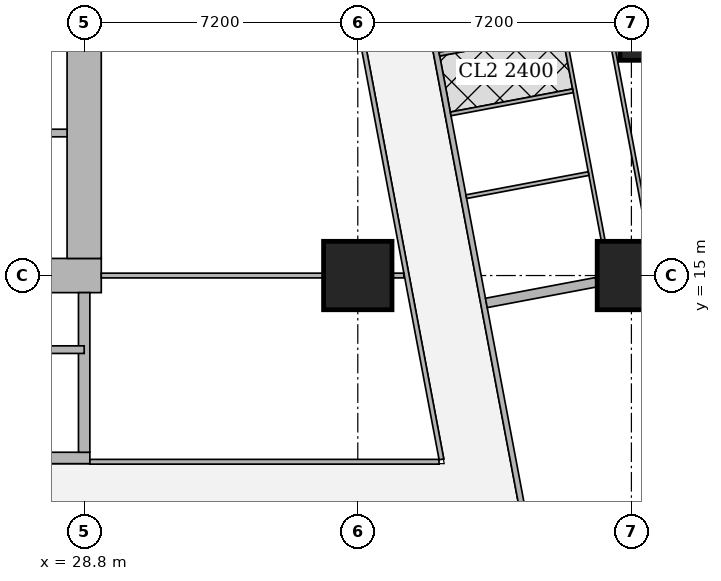
"""IFC4 building model, lengths in metres.
Left out: names, types, materials, properties, quantities, classifications, styles, units other than length and angle.
Written with IfcOpenShell. Run it as: python <this file> out.ifc"""

import sys

from ifc_helpers import new_model, si_unit, direction, frame, frame_2d, origin, origin_2d, place, context, subcontext, project, spatial, rectangle, extrude, element, fill, save


model = new_model("IFC4")
c1 = context("Model", 3, precision=1e-05, world=origin(), true_north=direction((0.0, 1.0)))
c2 = subcontext(c1, "Body", "Model", "MODEL_VIEW")
j1 = project(units=[si_unit("LENGTHUNIT", "METRE"), si_unit("PLANEANGLEUNIT", "RADIAN")], contexts=[c1])
p1 = place(None, origin())
s1 = spatial("IfcSite", under=j1, at=p1, CompositionType="ELEMENT")
p2 = place(p1, origin())
s2 = spatial("IfcBuilding", under=s1, at=p2, CompositionType="ELEMENT")
p3 = place(p2, frame((0.0, 0.0, 31.25)))
s3 = spatial("IfcBuildingStorey", under=s2, at=p3, CompositionType="ELEMENT", Elevation=31.25)
for number, where, z_axis, x_axis in (
    (1, (36.0, 15.0, 0.0), (0.0, 0.0, 1.0), (1.0, 0.0, 0.0)),
    (2, (43.2, 15.0, 0.0), (0.0, 0.0, 1.0), (1.0, 0.0, 0.0)),
):
    element("IfcColumn", number, at=place(p3, frame(where, z_axis=z_axis, x_axis=x_axis)), inside=s3, PredefinedType="COLUMN", context=c2, shape_type="SweptSolid", body=[
        extrude(rectangle(XDim=1.8, YDim=1.8, at=origin_2d()), origin(), (0.0, 0.0, 1.0), 3.75),
    ])
p4 = place(p3, frame((44.697, 22.263, 0.0), z_axis=(0.0, 0.0, 1.0), x_axis=(1.0, 0.0, 0.0)))
e3 = element("IfcColumn", 3, at=p4, inside=s3, PredefinedType="COLUMN", context=c2, shape_type="SweptSolid", body=[
    extrude(rectangle(XDim=3.6, YDim=3.2, at=origin_2d()), origin(), (0.0, 0.0, 1.0), 3.75),
])
p5 = place(p3, frame((13.95, 15.0, 0.0), z_axis=(0.0, 0.0, 1.0), x_axis=(1.0, 0.0, 0.0)))
e4 = element("IfcWall", 4, at=p5, inside=s3, PredefinedType="SHEAR", context=c2, shape_type="SweptSolid", body=[
    extrude(rectangle(XDim=15.3, YDim=0.9, at=frame_2d((7.65, 0.0))), origin(), (0.0, 0.0, 1.0), 3.75),
])
p6 = place(p5, frame((4.45, 0.0, 0.0)))
e5 = element("IfcOpeningElement", 5, at=p6, cuts=e4, PredefinedType="OPENING", context=c2, shape_type="SweptSolid", body=[
    extrude(rectangle(XDim=1.8, YDim=2.1, at=frame_2d((0.9, 1.05))), frame((0.0, 0.46, 0.0), z_axis=(0.0, -1.0, 0.0), x_axis=(1.0, 0.0, 0.0)), (0.0, 0.0, 1.0), 0.92),
])
p7 = place(p5, frame((10.7, 0.0, 0.0)))
e6 = element("IfcOpeningElement", 6, at=p7, cuts=e4, PredefinedType="OPENING", context=c2, shape_type="SweptSolid", body=[
    extrude(rectangle(XDim=1.1, YDim=2.1, at=frame_2d((0.55, 1.05))), frame((0.0, 0.46, 0.0), z_axis=(0.0, -1.0, 0.0), x_axis=(1.0, 0.0, 0.0)), (0.0, 0.0, 1.0), 0.92),
])
p8 = place(p3, frame((28.8, 15.45, 0.0), z_axis=(0.0, 0.0, 1.0), x_axis=(0.0, 1.0, 0.0)))
e7 = element("IfcWall", 7, at=p8, inside=s3, PredefinedType="SHEAR", context=c2, shape_type="SweptSolid", body=[
    extrude(rectangle(XDim=14.1, YDim=0.9, at=frame_2d((7.05, 0.0))), origin(), (0.0, 0.0, 1.0), 3.75),
])
p9 = place(p3, frame((21.45, 10.2, 0.0), z_axis=(0.0, 0.0, 1.0), x_axis=(1.0, 0.0, 0.0)))
e8 = element("IfcWall", 8, at=p9, inside=s3, PredefinedType="SHEAR", context=c2, shape_type="SweptSolid", body=[
    extrude(rectangle(XDim=7.5, YDim=0.3, at=frame_2d((3.75, 0.0))), origin(), (0.0, 0.0, 1.0), 3.75),
])
p10 = place(p9, frame((0.5, 0.0, 0.0)))
e9 = element("IfcOpeningElement", 9, at=p10, cuts=e8, PredefinedType="OPENING", context=c2, shape_type="SweptSolid", body=[
    extrude(rectangle(XDim=1.1, YDim=2.1, at=frame_2d((0.55, 1.05))), frame((0.0, 0.16, 0.0), z_axis=(0.0, -1.0, 0.0), x_axis=(1.0, 0.0, 0.0)), (0.0, 0.0, 1.0), 0.32),
])
p11 = place(p3, frame((28.8, 10.35, 0.0), z_axis=(0.0, 0.0, 1.0), x_axis=(0.0, 1.0, 0.0)))
e10 = element("IfcWall", 10, at=p11, inside=s3, PredefinedType="SHEAR", context=c2, shape_type="SweptSolid", body=[
    extrude(rectangle(XDim=4.2, YDim=0.3, at=frame_2d((2.1, 0.0))), origin(), (0.0, 0.0, 1.0), 3.75),
])
p12 = place(p3, frame((50.653, 2.703, 0.0), z_axis=(0.0, 0.0, 1.0), x_axis=(-0.185612026696, 0.982623109613, 0.0)))
e11 = element("IfcWall", 11, at=p12, inside=s3, PredefinedType="SOLIDWALL", context=c2, shape_type="SweptSolid", body=[
    extrude(rectangle(XDim=41.393, YDim=0.2, at=frame_2d((20.697, 0.0))), origin(), (0.0, 0.0, 1.0), 3.5),
])
p13 = place(p12, frame((1.633, 0.0, 0.9)))
e12 = element("IfcOpeningElement", 12, at=p13, cuts=e11, PredefinedType="OPENING", context=c2, shape_type="SweptSolid", body=[
    extrude(rectangle(XDim=1.8, YDim=1.5, at=frame_2d((0.9, 0.75))), frame((0.0, 0.11, 0.0), z_axis=(0.0, -1.0, 0.0), x_axis=(1.0, 0.0, 0.0)), (0.0, 0.0, 1.0), 0.22),
])
p14 = place(p12, frame((6.032, 0.0, 0.9)))
e13 = element("IfcOpeningElement", 13, at=p14, cuts=e11, PredefinedType="OPENING", context=c2, shape_type="SweptSolid", body=[
    extrude(rectangle(XDim=1.8, YDim=1.5, at=frame_2d((0.9, 0.75))), frame((0.0, 0.11, 0.0), z_axis=(0.0, -1.0, 0.0), x_axis=(1.0, 0.0, 0.0)), (0.0, 0.0, 1.0), 0.22),
])
p15 = place(p12, frame((9.848, 0.0, 0.9)))
e14 = element("IfcOpeningElement", 14, at=p15, cuts=e11, PredefinedType="OPENING", context=c2, shape_type="SweptSolid", body=[
    extrude(rectangle(XDim=1.8, YDim=1.5, at=frame_2d((0.9, 0.75))), frame((0.0, 0.11, 0.0), z_axis=(0.0, -1.0, 0.0), x_axis=(1.0, 0.0, 0.0)), (0.0, 0.0, 1.0), 0.22),
])
p16 = place(p12, frame((17.481, 0.0, 0.9)))
e15 = element("IfcOpeningElement", 15, at=p16, cuts=e11, PredefinedType="OPENING", context=c2, shape_type="SweptSolid", body=[
    extrude(rectangle(XDim=1.8, YDim=1.5, at=frame_2d((0.9, 0.75))), frame((0.0, 0.11, 0.0), z_axis=(0.0, -1.0, 0.0), x_axis=(1.0, 0.0, 0.0)), (0.0, 0.0, 1.0), 0.22),
])
p17 = place(p12, frame((21.297, 0.0, 0.9)))
e16 = element("IfcOpeningElement", 16, at=p17, cuts=e11, PredefinedType="OPENING", context=c2, shape_type="SweptSolid", body=[
    extrude(rectangle(XDim=1.8, YDim=1.5, at=frame_2d((0.9, 0.75))), frame((0.0, 0.11, 0.0), z_axis=(0.0, -1.0, 0.0), x_axis=(1.0, 0.0, 0.0)), (0.0, 0.0, 1.0), 0.22),
])
p18 = place(p12, frame((25.113, 0.0, 0.9)))
e17 = element("IfcOpeningElement", 17, at=p18, cuts=e11, PredefinedType="OPENING", context=c2, shape_type="SweptSolid", body=[
    extrude(rectangle(XDim=1.8, YDim=1.5, at=frame_2d((0.9, 0.75))), frame((0.0, 0.11, 0.0), z_axis=(0.0, -1.0, 0.0), x_axis=(1.0, 0.0, 0.0)), (0.0, 0.0, 1.0), 0.22),
])
p19 = place(p12, frame((28.93, 0.0, 0.9)))
e18 = element("IfcOpeningElement", 18, at=p19, cuts=e11, PredefinedType="OPENING", context=c2, shape_type="SweptSolid", body=[
    extrude(rectangle(XDim=1.8, YDim=1.5, at=frame_2d((0.9, 0.75))), frame((0.0, 0.11, 0.0), z_axis=(0.0, -1.0, 0.0), x_axis=(1.0, 0.0, 0.0)), (0.0, 0.0, 1.0), 0.22),
])
p20 = place(p12, frame((32.746, 0.0, 0.9)))
e19 = element("IfcOpeningElement", 19, at=p20, cuts=e11, PredefinedType="OPENING", context=c2, shape_type="SweptSolid", body=[
    extrude(rectangle(XDim=1.8, YDim=1.5, at=frame_2d((0.9, 0.75))), frame((0.0, 0.11, 0.0), z_axis=(0.0, -1.0, 0.0), x_axis=(1.0, 0.0, 0.0)), (0.0, 0.0, 1.0), 0.22),
])
p21 = place(p12, frame((36.481, 0.0, 0.9)))
e20 = element("IfcOpeningElement", 20, at=p21, cuts=e11, PredefinedType="OPENING", context=c2, shape_type="SweptSolid", body=[
    extrude(rectangle(XDim=1.8, YDim=1.5, at=frame_2d((0.9, 0.75))), frame((0.0, 0.11, 0.0), z_axis=(0.0, -1.0, 0.0), x_axis=(1.0, 0.0, 0.0)), (0.0, 0.0, 1.0), 0.22),
])
p22 = place(p3, frame((35.094, 36.585, 0.0), z_axis=(0.0, 0.0, 1.0), x_axis=(0.185588860311, -0.982627485331, 0.0)))
e21 = element("IfcWall", 21, at=p22, inside=s3, PredefinedType="SOLIDWALL", context=c2, shape_type="SweptSolid", body=[
    extrude(rectangle(XDim=34.797, YDim=0.15, at=frame_2d((17.399, 0.0))), origin(), (0.0, 0.0, 1.0), 2.5),
])
p23 = place(p22, frame((6.012, 0.0, 0.0)))
e22 = element("IfcOpeningElement", 22, at=p23, cuts=e21, PredefinedType="OPENING", context=c2, shape_type="SweptSolid", body=[
    extrude(rectangle(XDim=1.0, YDim=2.1, at=frame_2d((0.5, 1.05))), frame((0.0, 0.085, 0.0), z_axis=(0.0, -1.0, 0.0), x_axis=(1.0, 0.0, 0.0)), (0.0, 0.0, 1.0), 0.17),
])
p24 = place(p22, frame((9.828, 0.0, 0.0)))
e23 = element("IfcOpeningElement", 23, at=p24, cuts=e21, PredefinedType="OPENING", context=c2, shape_type="SweptSolid", body=[
    extrude(rectangle(XDim=1.0, YDim=2.1, at=frame_2d((0.5, 1.05))), frame((0.0, 0.085, 0.0), z_axis=(0.0, -1.0, 0.0), x_axis=(1.0, 0.0, 0.0)), (0.0, 0.0, 1.0), 0.17),
])
p25 = place(p22, frame((25.9, 0.0, 0.0)))
e24 = element("IfcOpeningElement", 24, at=p25, cuts=e21, PredefinedType="OPENING", context=c2, shape_type="SweptSolid", body=[
    extrude(rectangle(XDim=1.0, YDim=2.1, at=frame_2d((0.5, 1.05))), frame((0.0, 0.085, 0.0), z_axis=(0.0, -1.0, 0.0), x_axis=(1.0, 0.0, 0.0)), (0.0, 0.0, 1.0), 0.17),
])
p26 = place(p3, frame((41.894, 25.366, 0.0), z_axis=(0.0, 0.0, 1.0), x_axis=(0.185581190027, -0.982628933987, 0.0)))
e25 = element("IfcWall", 25, at=p26, inside=s3, PredefinedType="PARTITIONING", context=c2, shape_type="SweptSolid", body=[
    extrude(rectangle(XDim=9.623, YDim=0.1, at=frame_2d((4.812, 0.0))), origin(), (0.0, 0.0, 1.0), 2.5),
])
p27 = place(p26, frame((0.151, 0.0, 0.0)))
e26 = element("IfcOpeningElement", 26, at=p27, cuts=e25, PredefinedType="OPENING", context=c2, shape_type="SweptSolid", body=[
    extrude(rectangle(XDim=0.9, YDim=2.1, at=frame_2d((0.45, 1.05))), frame((0.0, 0.06, 0.0), z_axis=(0.0, -1.0, 0.0), x_axis=(1.0, 0.0, 0.0)), (0.0, 0.0, 1.0), 0.12),
])
p28 = place(p26, frame((5.05, 0.0, 0.0)))
e27 = element("IfcOpeningElement", 27, at=p28, cuts=e25, PredefinedType="OPENING", context=c2, shape_type="SweptSolid", body=[
    extrude(rectangle(XDim=0.9, YDim=2.1, at=frame_2d((0.45, 1.05))), frame((0.0, 0.06, 0.0), z_axis=(0.0, -1.0, 0.0), x_axis=(1.0, 0.0, 0.0)), (0.0, 0.0, 1.0), 0.12),
])
p29 = place(p3, frame((40.706, 25.192, 0.0), z_axis=(0.0, 0.0, 1.0), x_axis=(0.185572668944, -0.982630543257, 0.0)))
e28 = element("IfcWall", 28, at=p29, inside=s3, PredefinedType="PARTITIONING", context=c2, shape_type="SweptSolid", body=[
    extrude(rectangle(XDim=9.446, YDim=0.1, at=frame_2d((4.723, 0.0))), origin(), (0.0, 0.0, 1.0), 2.5),
])
p30 = place(p29, frame((0.655, 0.0, 0.0)))
e29 = element("IfcOpeningElement", 29, at=p30, cuts=e28, PredefinedType="OPENING", context=c2, shape_type="SweptSolid", body=[
    extrude(rectangle(XDim=0.9, YDim=2.1, at=frame_2d((0.45, 1.05))), frame((0.0, 0.06, 0.0), z_axis=(0.0, -1.0, 0.0), x_axis=(1.0, 0.0, 0.0)), (0.0, 0.0, 1.0), 0.12),
])
p31 = place(p29, frame((4.166, 0.0, 0.0)))
e30 = element("IfcOpeningElement", 30, at=p31, cuts=e28, PredefinedType="OPENING", context=c2, shape_type="SweptSolid", body=[
    extrude(rectangle(XDim=0.9, YDim=2.1, at=frame_2d((0.45, 1.05))), frame((0.0, 0.06, 0.0), z_axis=(0.0, -1.0, 0.0), x_axis=(1.0, 0.0, 0.0)), (0.0, 0.0, 1.0), 0.12),
])
p32 = place(p29, frame((8.396, 0.0, 0.0)))
e31 = element("IfcOpeningElement", 31, at=p32, cuts=e28, PredefinedType="OPENING", context=c2, shape_type="SweptSolid", body=[
    extrude(rectangle(XDim=0.9, YDim=2.1, at=frame_2d((0.45, 1.05))), frame((0.0, 0.06, 0.0), z_axis=(0.0, -1.0, 0.0), x_axis=(1.0, 0.0, 0.0)), (0.0, 0.0, 1.0), 0.12),
])
p33 = place(p29, frame((2.563, 0.0, 0.0)))
e32 = element("IfcOpeningElement", 32, at=p33, cuts=e28, PredefinedType="OPENING", context=c2, shape_type="SweptSolid", body=[
    extrude(rectangle(XDim=0.9, YDim=2.1, at=frame_2d((0.45, 1.05))), frame((0.0, 0.06, 0.0), z_axis=(0.0, -1.0, 0.0), x_axis=(1.0, 0.0, 0.0)), (0.0, 0.0, 1.0), 0.12),
])
p34 = place(p29, frame((6.074, 0.0, 0.0)))
e33 = element("IfcOpeningElement", 33, at=p34, cuts=e28, PredefinedType="OPENING", context=c2, shape_type="SweptSolid", body=[
    extrude(rectangle(XDim=0.9, YDim=2.1, at=frame_2d((0.45, 1.05))), frame((0.0, 0.06, 0.0), z_axis=(0.0, -1.0, 0.0), x_axis=(1.0, 0.0, 0.0)), (0.0, 0.0, 1.0), 0.12),
])
for number, where, z_axis, x_axis in (
    (34, (41.365, 21.433, 0.0), (0.0, 0.0, 1.0), (-0.983, -0.186, 0.0)),
    (35, (42.073, 17.683, 0.0), (0.0, 0.0, 1.0), (-0.983, -0.186, 0.0)),
    (36, (41.662, 19.861, 0.0), (0.0, 0.0, 1.0), (-0.983, -0.186, 0.0)),
):
    element("IfcWall", number, at=place(p3, frame(where, z_axis=z_axis, x_axis=x_axis)), inside=s3, PredefinedType="PARTITIONING", context=c2, shape_type="SweptSolid", body=[
        extrude(rectangle(XDim=3.275, YDim=0.1, at=frame_2d((1.637, 0.0))), origin(), (0.0, 0.0, 1.0), 3.5),
    ])
p35 = place(p3, frame((42.276, 14.825, 0.0), z_axis=(0.0, 0.0, 1.0), x_axis=(-0.982656521819, -0.185435056358, 0.0)))
e37 = element("IfcWall", 37, at=p35, inside=s3, PredefinedType="SOLIDWALL", context=c2, shape_type="SweptSolid", body=[
    extrude(rectangle(XDim=2.944, YDim=0.25, at=frame_2d((1.472, 0.0))), origin(), (0.0, 0.0, 1.0), 3.5),
])
p36 = place(p3, frame((28.95, 10.1, 0.0), z_axis=(0.0, 0.0, 1.0), x_axis=(1.0, 0.0, 0.0)))
e38 = element("IfcWall", 38, at=p36, inside=s3, PredefinedType="PARTITIONING", context=c2, shape_type="SweptSolid", body=[
    extrude(rectangle(XDim=9.188, YDim=0.125, at=frame_2d((4.594, 0.0))), origin(), (0.0, 0.0, 1.0), 3.5),
])
p37 = place(p3, frame((38.202, 10.163, 0.0), z_axis=(0.0, 0.0, 1.0), x_axis=(-0.185610321132, 0.982623431783, 0.0)))
e39 = element("IfcWall", 39, at=p37, inside=s3, PredefinedType="PARTITIONING", context=c2, shape_type="SweptSolid", body=[
    extrude(rectangle(XDim=25.111, YDim=0.125, at=frame_2d((12.556, 0.0))), origin(), (0.0, 0.0, 1.0), 2.5),
])
p38 = place(p37, frame((0.708, 0.0, 0.0)))
e40 = element("IfcOpeningElement", 40, at=p38, cuts=e39, PredefinedType="OPENING", context=c2, shape_type="SweptSolid", body=[
    extrude(rectangle(XDim=1.0, YDim=2.1, at=frame_2d((0.5, 1.05))), frame((0.0, 0.073, 0.0), z_axis=(0.0, -1.0, 0.0), x_axis=(1.0, 0.0, 0.0)), (0.0, 0.0, 1.0), 0.145),
])
p39 = place(p37, frame((6.1, 0.0, 0.0)))
e41 = element("IfcOpeningElement", 41, at=p39, cuts=e39, PredefinedType="OPENING", context=c2, shape_type="SweptSolid", body=[
    extrude(rectangle(XDim=1.0, YDim=2.1, at=frame_2d((0.5, 1.05))), frame((0.0, 0.073, 0.0), z_axis=(0.0, -1.0, 0.0), x_axis=(1.0, 0.0, 0.0)), (0.0, 0.0, 1.0), 0.145),
])
p40 = place(p37, frame((13.378, 0.0, 0.0)))
e42 = element("IfcOpeningElement", 42, at=p40, cuts=e39, PredefinedType="OPENING", context=c2, shape_type="SweptSolid", body=[
    extrude(rectangle(XDim=1.0, YDim=2.1, at=frame_2d((0.5, 1.05))), frame((0.0, 0.073, 0.0), z_axis=(0.0, -1.0, 0.0), x_axis=(1.0, 0.0, 0.0)), (0.0, 0.0, 1.0), 0.145),
])
p41 = place(p37, frame((17.194, 0.0, 0.0)))
e43 = element("IfcOpeningElement", 43, at=p41, cuts=e39, PredefinedType="OPENING", context=c2, shape_type="SweptSolid", body=[
    extrude(rectangle(XDim=1.0, YDim=2.1, at=frame_2d((0.5, 1.05))), frame((0.0, 0.073, 0.0), z_axis=(0.0, -1.0, 0.0), x_axis=(1.0, 0.0, 0.0)), (0.0, 0.0, 1.0), 0.145),
])
p42 = place(p37, frame((21.35, 0.0, 0.0)))
e44 = element("IfcOpeningElement", 44, at=p42, cuts=e39, PredefinedType="OPENING", context=c2, shape_type="SweptSolid", body=[
    extrude(rectangle(XDim=1.0, YDim=2.1, at=frame_2d((0.5, 1.05))), frame((0.0, 0.073, 0.0), z_axis=(0.0, -1.0, 0.0), x_axis=(1.0, 0.0, 0.0)), (0.0, 0.0, 1.0), 0.145),
])
p43 = place(p3, frame((29.25, 15.0, 0.0), z_axis=(0.0, 0.0, 1.0), x_axis=(1.0, 0.0, 0.0)))
e45 = element("IfcWall", 45, at=p43, inside=s3, PredefinedType="PARTITIONING", context=c2, shape_type="SweptSolid", body=[
    extrude(rectangle(XDim=5.849, YDim=0.125, at=frame_2d((2.925, 0.0))), origin(), (0.0, 0.0, 1.0), 3.5),
])
p44 = place(p3, frame((36.901, 15.0, 0.0), z_axis=(0.0, 0.0, 1.0), x_axis=(1.0, 0.0, 0.0)))
e46 = element("IfcWall", 46, at=p44, inside=s3, PredefinedType="PARTITIONING", context=c2, shape_type="SweptSolid", body=[
    extrude(rectangle(XDim=0.312, YDim=0.125, at=frame_2d((0.156, 0.0))), origin(), (0.0, 0.0, 1.0), 3.5),
])
p45 = place(p3, frame((23.0, 13.05, 0.0), z_axis=(0.0, 0.0, 1.0), x_axis=(1.0, 0.0, 0.0)))
e47 = element("IfcWall", 47, at=p45, inside=s3, PredefinedType="SHEAR", context=c2, shape_type="SweptSolid", body=[
    extrude(rectangle(XDim=5.8, YDim=0.2, at=frame_2d((2.9, 0.0))), origin(), (0.0, 0.0, 1.0), 3.75),
])
p46 = place(p3, frame((27.4, 18.75, 0.0), z_axis=(0.0, 0.0, 1.0), x_axis=(1.0, 0.0, 0.0)))
e48 = element("IfcWall", 48, at=p46, inside=s3, PredefinedType="SOLIDWALL", context=c2, shape_type="SweptSolid", body=[
    extrude(rectangle(XDim=0.95, YDim=0.2, at=frame_2d((0.475, 0.0))), origin(), (0.0, 0.0, 1.0), 3.5),
])
p47 = place(p28, origin())
e49 = element("IfcDoor", 49, at=p47, inside=s3, OperationType="SINGLE_SWING_LEFT", PredefinedType="DOOR", context=c2, shape_type="SweptSolid", body=[
    extrude(rectangle(XDim=0.9, YDim=2.1, at=frame_2d((0.45, 1.05))), frame((0.0, 0.025, 0.0), z_axis=(0.0, -1.0, 0.0), x_axis=(1.0, 0.0, 0.0)), (0.0, 0.0, 1.0), 0.05),
])
fill(e27, e49)
p48 = place(p31, origin())
e50 = element("IfcDoor", 50, at=p48, inside=s3, OperationType="SINGLE_SWING_RIGHT", PredefinedType="DOOR", context=c2, shape_type="SweptSolid", body=[
    extrude(rectangle(XDim=0.9, YDim=2.1, at=frame_2d((0.45, 1.05))), frame((0.0, 0.025, 0.0), z_axis=(0.0, -1.0, 0.0), x_axis=(1.0, 0.0, 0.0)), (0.0, 0.0, 1.0), 0.05),
])
fill(e30, e50)
p49 = place(p32, origin())
e51 = element("IfcDoor", 51, at=p49, inside=s3, OperationType="SINGLE_SWING_LEFT", PredefinedType="DOOR", context=c2, shape_type="SweptSolid", body=[
    extrude(rectangle(XDim=0.9, YDim=2.1, at=frame_2d((0.45, 1.05))), frame((0.0, 0.025, 0.0), z_axis=(0.0, -1.0, 0.0), x_axis=(1.0, 0.0, 0.0)), (0.0, 0.0, 1.0), 0.05),
])
fill(e31, e51)
p50 = place(p34, origin())
e52 = element("IfcDoor", 52, at=p50, inside=s3, OperationType="SINGLE_SWING_LEFT", PredefinedType="DOOR", context=c2, shape_type="SweptSolid", body=[
    extrude(rectangle(XDim=0.9, YDim=2.1, at=frame_2d((0.45, 1.05))), frame((0.0, 0.025, 0.0), z_axis=(0.0, -1.0, 0.0), x_axis=(1.0, 0.0, 0.0)), (0.0, 0.0, 1.0), 0.05),
])
fill(e33, e52)
p51 = place(p25, origin())
e53 = element("IfcDoor", 53, at=p51, inside=s3, OperationType="SINGLE_SWING_LEFT", PredefinedType="DOOR", context=c2, shape_type="SweptSolid", body=[
    extrude(rectangle(XDim=1.0, YDim=2.1, at=frame_2d((0.5, 1.05))), frame((0.0, 0.025, 0.0), z_axis=(0.0, -1.0, 0.0), x_axis=(1.0, 0.0, 0.0)), (0.0, 0.0, 1.0), 0.05),
])
fill(e24, e53)
p52 = place(p38, origin())
e54 = element("IfcDoor", 54, at=p52, inside=s3, OperationType="SINGLE_SWING_LEFT", PredefinedType="DOOR", context=c2, shape_type="SweptSolid", body=[
    extrude(rectangle(XDim=1.0, YDim=2.1, at=frame_2d((0.5, 1.05))), frame((0.0, 0.025, 0.0), z_axis=(0.0, -1.0, 0.0), x_axis=(1.0, 0.0, 0.0)), (0.0, 0.0, 1.0), 0.05),
])
fill(e40, e54)
p53 = place(p39, origin())
e55 = element("IfcDoor", 55, at=p53, inside=s3, OperationType="SINGLE_SWING_LEFT", PredefinedType="DOOR", context=c2, shape_type="SweptSolid", body=[
    extrude(rectangle(XDim=1.0, YDim=2.1, at=frame_2d((0.5, 1.05))), frame((0.0, 0.025, 0.0), z_axis=(0.0, -1.0, 0.0), x_axis=(1.0, 0.0, 0.0)), (0.0, 0.0, 1.0), 0.05),
])
fill(e41, e55)
save(model, sys.argv[1])
